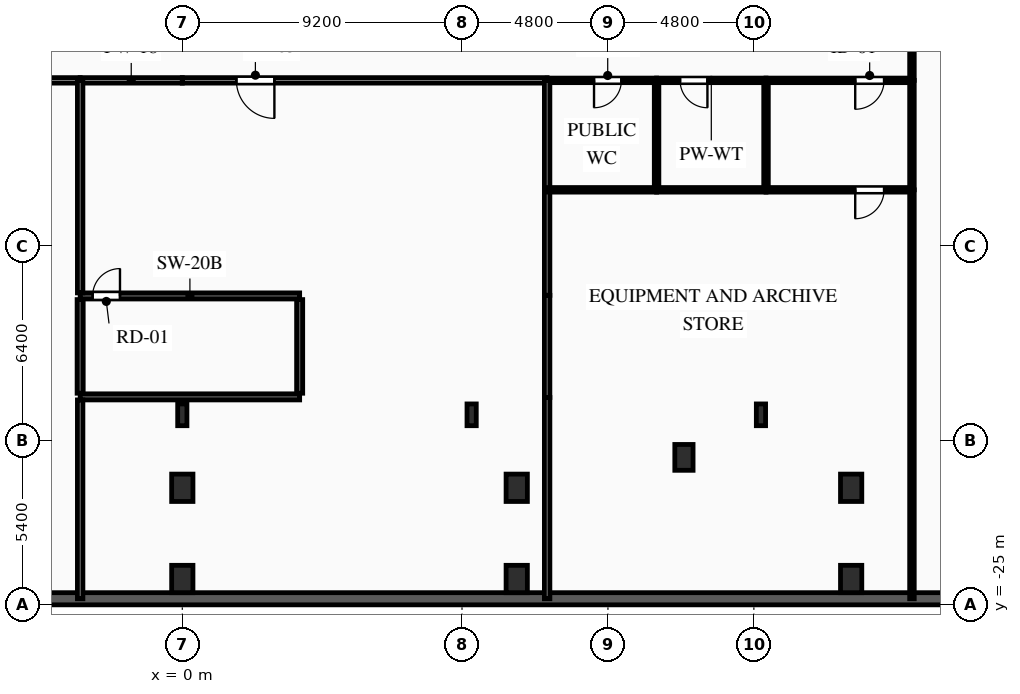
"""IFC4 building model, lengths in metres.
Left out: names, types, materials, properties, quantities, classifications, styles, units other than length and angle.
Written with IfcOpenShell. Run it as: python <this file> out.ifc"""

import sys

from ifc_helpers import new_model, si_unit, direction, frame, frame_2d, origin, origin_2d, place, context, subcontext, project, spatial, rectangle, i_section, extrude, element, fill, save


model = new_model("IFC4")
c1 = context("Model", 3, precision=1e-05, world=origin(), true_north=direction((0.0, 1.0)))
c2 = subcontext(c1, "Body", "Model", "MODEL_VIEW")
j1 = project(units=[si_unit("LENGTHUNIT", "METRE"), si_unit("PLANEANGLEUNIT", "RADIAN")], contexts=[c1])
p1 = place(None, origin())
s1 = spatial("IfcSite", under=j1, at=p1, CompositionType="ELEMENT")
p2 = place(p1, origin())
s2 = spatial("IfcBuilding", under=s1, at=p2, CompositionType="ELEMENT")
p3 = place(p2, frame((0.0, 0.0, -4.5)))
s3 = spatial("IfcBuildingStorey", under=s2, at=p3, CompositionType="ELEMENT", Elevation=-4.5)
for number, where, z_axis, x_axis in (
    (1, (0.0, -21.15, 0.0), (0.0, 0.0, 1.0), (1.0, 0.0, 0.0)),
    (2, (11.0, -21.15, 0.0), (0.0, 0.0, 1.0), (1.0, 0.0, 0.0)),
    (3, (22.0, -21.15, 0.0), (0.0, 0.0, 1.0), (1.0, 0.0, 0.0)),
    (4, (0.0, -24.15, 0.0), (0.0, 0.0, 1.0), (1.0, 0.0, 0.0)),
    (5, (11.0, -24.15, 0.0), (0.0, 0.0, 1.0), (1.0, 0.0, 0.0)),
    (6, (22.0, -24.15, 0.0), (0.0, 0.0, 1.0), (1.0, 0.0, 0.0)),
):
    element("IfcColumn", number, at=place(p3, frame(where, z_axis=z_axis, x_axis=x_axis)), inside=s3, PredefinedType="COLUMN", context=c2, shape_type="SweptSolid", body=[
        extrude(rectangle(XDim=0.7, YDim=0.9, at=origin_2d()), origin(), (0.0, 0.0, 1.0), 4.5),
    ])
p4 = place(p3, frame((16.5, -20.15, 0.0), z_axis=(0.0, 0.0, 1.0), x_axis=(1.0, 0.0, 0.0)))
e7 = element("IfcColumn", 7, at=p4, inside=s3, PredefinedType="PILASTER", context=c2, shape_type="SweptSolid", body=[
    extrude(rectangle(XDim=0.6, YDim=0.85, at=origin_2d()), origin(), (0.0, 0.0, 1.0), 4.5),
])
for number, where, z_axis, x_axis in (
    (8, (0.0, -18.75, 0.0), (0.0, 0.0, 1.0), (1.0, 0.0, 0.0)),
    (9, (9.517, -18.75, 0.0), (0.0, 0.0, 1.0), (1.0, 0.0, 0.0)),
    (10, (19.033, -18.75, 0.0), (0.0, 0.0, 1.0), (1.0, 0.0, 0.0)),
):
    element("IfcColumn", number, at=place(p3, frame(where, z_axis=z_axis, x_axis=x_axis)), inside=s3, PredefinedType="COLUMN", context=c2, shape_type="SweptSolid", body=[
        extrude(i_section(OverallWidth=0.304, OverallDepth=0.716, WebThickness=0.021, FlangeThickness=0.04, FilletRadius=0.027, at=origin_2d()), origin(), (0.0, 0.0, 1.0), 4.5),
    ])
p5 = place(p3, frame((38.3, -24.8, 0.0), z_axis=(0.0, 0.0, 1.0), x_axis=(-1.0, 0.0, 0.0)))
e11 = element("IfcWall", 11, at=p5, inside=s3, PredefinedType="SOLIDWALL", context=c2, shape_type="SweptSolid", body=[
    extrude(rectangle(XDim=76.6, YDim=0.4, at=frame_2d((38.3, 0.0))), origin(), (0.0, 0.0, 1.0), 4.16),
])
p6 = place(p3, frame((-3.36, -14.84, 0.0), z_axis=(0.0, 0.0, 1.0), x_axis=(1.0, 0.0, 0.0)))
e12 = element("IfcWall", 12, at=p6, inside=s3, PredefinedType="SHEAR", context=c2, shape_type="SweptSolid", body=[
    extrude(rectangle(XDim=7.22, YDim=0.2, at=frame_2d((3.61, 0.0))), origin(), (0.0, 0.0, 1.0), 4.16),
])
p7 = place(p6, frame((0.41, 0.0, 0.0)))
e13 = element("IfcOpeningElement", 13, at=p7, cuts=e12, PredefinedType="OPENING", context=c2, shape_type="SweptSolid", body=[
    extrude(rectangle(XDim=0.9, YDim=2.1, at=frame_2d((0.45, 1.05))), frame((0.0, 0.11, 0.0), z_axis=(0.0, -1.0, 0.0), x_axis=(1.0, 0.0, 0.0)), (0.0, 0.0, 1.0), 0.22),
])
p8 = place(p3, frame((-3.36, -18.16, 0.0), z_axis=(0.0, 0.0, 1.0), x_axis=(1.0, 0.0, 0.0)))
e14 = element("IfcWall", 14, at=p8, inside=s3, PredefinedType="SHEAR", context=c2, shape_type="SweptSolid", body=[
    extrude(rectangle(XDim=7.22, YDim=0.2, at=frame_2d((3.61, 0.0))), origin(), (0.0, 0.0, 1.0), 4.16),
])
for number, where, z_axis, x_axis in (
    (15, (-3.36, -18.04, 0.0), (0.0, 0.0, 1.0), (0.0, 1.0, 0.0)),
    (16, (3.86, -18.04, 0.0), (0.0, 0.0, 1.0), (0.0, 1.0, 0.0)),
):
    element("IfcWall", number, at=place(p3, frame(where, z_axis=z_axis, x_axis=x_axis)), inside=s3, PredefinedType="SHEAR", context=c2, shape_type="SweptSolid", body=[
        extrude(rectangle(XDim=3.08, YDim=0.2, at=frame_2d((1.54, 0.0))), origin(), (0.0, 0.0, 1.0), 4.16),
    ])
p9 = place(p3, frame((-3.36, -7.75, 0.0), z_axis=(0.0, 0.0, 1.0), x_axis=(-1.0, 0.0, 0.0)))
e17 = element("IfcWall", 17, at=p9, inside=s3, PredefinedType="PARTITIONING", context=c2, shape_type="SweptSolid", body=[
    extrude(rectangle(XDim=20.64, YDim=0.18, at=frame_2d((10.32, 0.0))), origin(), (0.0, 0.0, 1.0), 4.16),
])
p10 = place(p9, frame((9.695, 0.0, 0.0)))
e18 = element("IfcOpeningElement", 18, at=p10, cuts=e17, PredefinedType="OPENING", context=c2, shape_type="SweptSolid", body=[
    extrude(rectangle(XDim=1.25, YDim=2.2, at=frame_2d((0.625, 1.1))), frame((0.0, 0.1, 0.0), z_axis=(0.0, -1.0, 0.0), x_axis=(1.0, 0.0, 0.0)), (0.0, 0.0, 1.0), 0.2),
])
p11 = place(p3, frame((0.0, -7.75, 0.0), z_axis=(0.0, 0.0, 1.0), x_axis=(-1.0, 0.0, 0.0)))
e19 = element("IfcWall", 19, at=p11, inside=s3, PredefinedType="PARTITIONING", context=c2, shape_type="SweptSolid", body=[
    extrude(rectangle(XDim=3.36, YDim=0.18, at=frame_2d((1.68, 0.0))), origin(), (0.0, 0.0, 1.0), 4.16),
])
p12 = place(p3, frame((12.0, -7.75, 0.0), z_axis=(0.0, 0.0, 1.0), x_axis=(-1.0, 0.0, 0.0)))
e20 = element("IfcWall", 20, at=p12, inside=s3, PredefinedType="PARTITIONING", context=c2, shape_type="SweptSolid", body=[
    extrude(rectangle(XDim=12.0, YDim=0.18, at=frame_2d((6.0, 0.0))), origin(), (0.0, 0.0, 1.0), 4.16),
])
p13 = place(p12, frame((8.971, 0.0, 0.0)))
e21 = element("IfcOpeningElement", 21, at=p13, cuts=e20, PredefinedType="OPENING", context=c2, shape_type="SweptSolid", body=[
    extrude(rectangle(XDim=1.25, YDim=2.2, at=frame_2d((0.625, 1.1))), frame((0.0, 0.1, 0.0), z_axis=(0.0, -1.0, 0.0), x_axis=(1.0, 0.0, 0.0)), (0.0, 0.0, 1.0), 0.2),
])
p14 = place(p3, frame((24.0, -5.6, 0.0), z_axis=(0.0, 0.0, 1.0), x_axis=(0.0, -1.0, 0.0)))
e22 = element("IfcWall", 22, at=p14, inside=s3, PredefinedType="PARTITIONING", context=c2, shape_type="SweptSolid", body=[
    extrude(rectangle(XDim=2.15, YDim=0.15, at=frame_2d((1.075, 0.0))), origin(), (0.0, 0.0, 1.0), 4.16),
])
p15 = place(p3, frame((15.6, -7.75, 0.0), z_axis=(0.0, 0.0, 1.0), x_axis=(-1.0, 0.0, 0.0)))
e23 = element("IfcWall", 23, at=p15, inside=s3, PredefinedType="PLUMBINGWALL", context=c2, shape_type="SweptSolid", body=[
    extrude(rectangle(XDim=3.6, YDim=0.15, at=frame_2d((1.8, 0.0))), origin(), (0.0, 0.0, 1.0), 4.16),
])
p16 = place(p15, frame((1.157, 0.0, 0.0)))
e24 = element("IfcOpeningElement", 24, at=p16, cuts=e23, PredefinedType="OPENING", context=c2, shape_type="SweptSolid", body=[
    extrude(rectangle(XDim=0.9, YDim=2.1, at=frame_2d((0.45, 1.05))), frame((0.0, 0.085, 0.0), z_axis=(0.0, -1.0, 0.0), x_axis=(1.0, 0.0, 0.0)), (0.0, 0.0, 1.0), 0.17),
])
p17 = place(p3, frame((19.2, -7.75, 0.0), z_axis=(0.0, 0.0, 1.0), x_axis=(-1.0, 0.0, 0.0)))
e25 = element("IfcWall", 25, at=p17, inside=s3, PredefinedType="PLUMBINGWALL", context=c2, shape_type="SweptSolid", body=[
    extrude(rectangle(XDim=3.6, YDim=0.15, at=frame_2d((1.8, 0.0))), origin(), (0.0, 0.0, 1.0), 4.16),
])
p18 = place(p17, frame((1.927, 0.0, 0.0)))
e26 = element("IfcOpeningElement", 26, at=p18, cuts=e25, PredefinedType="OPENING", context=c2, shape_type="SweptSolid", body=[
    extrude(rectangle(XDim=0.9, YDim=2.1, at=frame_2d((0.45, 1.05))), frame((0.0, 0.085, 0.0), z_axis=(0.0, -1.0, 0.0), x_axis=(1.0, 0.0, 0.0)), (0.0, 0.0, 1.0), 0.17),
])
p19 = place(p3, frame((24.0, -7.75, 0.0), z_axis=(0.0, 0.0, 1.0), x_axis=(-1.0, 0.0, 0.0)))
e27 = element("IfcWall", 27, at=p19, inside=s3, PredefinedType="PARTITIONING", context=c2, shape_type="SweptSolid", body=[
    extrude(rectangle(XDim=4.8, YDim=0.15, at=frame_2d((2.4, 0.0))), origin(), (0.0, 0.0, 1.0), 4.16),
])
p20 = place(p19, frame((0.916, 0.0, 0.0)))
e28 = element("IfcOpeningElement", 28, at=p20, cuts=e27, PredefinedType="OPENING", context=c2, shape_type="SweptSolid", body=[
    extrude(rectangle(XDim=0.95, YDim=2.1, at=frame_2d((0.475, 1.05))), frame((0.0, 0.085, 0.0), z_axis=(0.0, -1.0, 0.0), x_axis=(1.0, 0.0, 0.0)), (0.0, 0.0, 1.0), 0.17),
])
p21 = place(p3, frame((-3.36, -7.75, 0.0), z_axis=(0.0, 0.0, 1.0), x_axis=(0.0, -1.0, 0.0)))
e29 = element("IfcWall", 29, at=p21, inside=s3, PredefinedType="PARTITIONING", context=c2, shape_type="SweptSolid", body=[
    extrude(rectangle(XDim=6.99, YDim=0.18, at=frame_2d((3.495, 0.0))), origin(), (0.0, 0.0, 1.0), 4.16),
])
p22 = place(p3, frame((-3.36, -18.26, 0.0), z_axis=(0.0, 0.0, 1.0), x_axis=(0.0, -1.0, 0.0)))
e30 = element("IfcWall", 30, at=p22, inside=s3, PredefinedType="PARTITIONING", context=c2, shape_type="SweptSolid", body=[
    extrude(rectangle(XDim=6.54, YDim=0.18, at=frame_2d((3.27, 0.0))), origin(), (0.0, 0.0, 1.0), 4.16),
])
p23 = place(p3, frame((12.0, -7.75, 0.0), z_axis=(0.0, 0.0, 1.0), x_axis=(0.0, -1.0, 0.0)))
e31 = element("IfcWall", 31, at=p23, inside=s3, PredefinedType="PARTITIONING", context=c2, shape_type="SweptSolid", body=[
    extrude(rectangle(XDim=3.6, YDim=0.18, at=frame_2d((1.8, 0.0))), origin(), (0.0, 0.0, 1.0), 4.16),
])
p24 = place(p3, frame((12.0, -18.18, 0.0), z_axis=(0.0, 0.0, 1.0), x_axis=(0.0, -1.0, 0.0)))
e32 = element("IfcWall", 32, at=p24, inside=s3, PredefinedType="PARTITIONING", context=c2, shape_type="SweptSolid", body=[
    extrude(rectangle(XDim=6.62, YDim=0.18, at=frame_2d((3.31, 0.0))), origin(), (0.0, 0.0, 1.0), 4.16),
])
p25 = place(p3, frame((12.0, -11.35, 0.0), z_axis=(0.0, 0.0, 1.0), x_axis=(0.0, -1.0, 0.0)))
e33 = element("IfcWall", 33, at=p25, inside=s3, PredefinedType="PARTITIONING", context=c2, shape_type="SweptSolid", body=[
    extrude(rectangle(XDim=3.47, YDim=0.18, at=frame_2d((1.735, 0.0))), origin(), (0.0, 0.0, 1.0), 4.16),
])
p26 = place(p3, frame((12.0, -14.82, 0.0), z_axis=(0.0, 0.0, 1.0), x_axis=(0.0, -1.0, 0.0)))
e34 = element("IfcWall", 34, at=p26, inside=s3, PredefinedType="PARTITIONING", context=c2, shape_type="SweptSolid", body=[
    extrude(rectangle(XDim=3.36, YDim=0.18, at=frame_2d((1.68, 0.0))), origin(), (0.0, 0.0, 1.0), 4.16),
])
p27 = place(p3, frame((24.0, -11.35, 0.0), z_axis=(0.0, 0.0, 1.0), x_axis=(0.0, 1.0, 0.0)))
e35 = element("IfcWall", 35, at=p27, inside=s3, PredefinedType="PARTITIONING", context=c2, shape_type="SweptSolid", body=[
    extrude(rectangle(XDim=3.6, YDim=0.15, at=frame_2d((1.8, 0.0))), origin(), (0.0, 0.0, 1.0), 4.16),
])
p28 = place(p3, frame((24.0, -24.8, 0.0), z_axis=(0.0, 0.0, 1.0), x_axis=(0.0, 1.0, 0.0)))
e36 = element("IfcWall", 36, at=p28, inside=s3, PredefinedType="PARTITIONING", context=c2, shape_type="SweptSolid", body=[
    extrude(rectangle(XDim=13.45, YDim=0.15, at=frame_2d((6.725, 0.0))), origin(), (0.0, 0.0, 1.0), 4.16),
])
for number, where, z_axis, x_axis in (
    (37, (15.6, -7.75, 0.0), (0.0, 0.0, 1.0), (0.0, -1.0, 0.0)),
    (38, (15.6, -11.35, 0.0), (0.0, 0.0, 1.0), (-1.0, 0.0, 0.0)),
    (39, (19.2, -7.75, 0.0), (0.0, 0.0, 1.0), (0.0, -1.0, 0.0)),
):
    element("IfcWall", number, at=place(p3, frame(where, z_axis=z_axis, x_axis=x_axis)), inside=s3, PredefinedType="PLUMBINGWALL", context=c2, shape_type="SweptSolid", body=[
        extrude(rectangle(XDim=3.6, YDim=0.15, at=frame_2d((1.8, 0.0))), origin(), (0.0, 0.0, 1.0), 4.16),
    ])
p29 = place(p3, frame((19.2, -11.35, 0.0), z_axis=(0.0, 0.0, 1.0), x_axis=(-1.0, 0.0, 0.0)))
e40 = element("IfcWall", 40, at=p29, inside=s3, PredefinedType="PLUMBINGWALL", context=c2, shape_type="SweptSolid", body=[
    extrude(rectangle(XDim=3.6, YDim=0.15, at=frame_2d((1.8, 0.0))), origin(), (0.0, 0.0, 1.0), 4.16),
])
p30 = place(p3, frame((24.0, -11.35, 0.0), z_axis=(0.0, 0.0, 1.0), x_axis=(-1.0, 0.0, 0.0)))
e41 = element("IfcWall", 41, at=p30, inside=s3, PredefinedType="PARTITIONING", context=c2, shape_type="SweptSolid", body=[
    extrude(rectangle(XDim=4.8, YDim=0.15, at=frame_2d((2.4, 0.0))), origin(), (0.0, 0.0, 1.0), 4.16),
])
p31 = place(p30, frame((0.916, 0.0, 0.0)))
e42 = element("IfcOpeningElement", 42, at=p31, cuts=e41, PredefinedType="OPENING", context=c2, shape_type="SweptSolid", body=[
    extrude(rectangle(XDim=0.95, YDim=2.1, at=frame_2d((0.475, 1.05))), frame((0.0, 0.085, 0.0), z_axis=(0.0, -1.0, 0.0), x_axis=(1.0, 0.0, 0.0)), (0.0, 0.0, 1.0), 0.17),
])
p32 = place(p7, origin())
e43 = element("IfcDoor", 43, at=p32, inside=s3, OperationType="SINGLE_SWING_RIGHT", PredefinedType="DOOR", context=c2, shape_type="SweptSolid", body=[
    extrude(rectangle(XDim=0.9, YDim=2.1, at=frame_2d((0.45, 1.05))), frame((0.0, 0.025, 0.0), z_axis=(0.0, -1.0, 0.0), x_axis=(1.0, 0.0, 0.0)), (0.0, 0.0, 1.0), 0.05),
])
fill(e13, e43)
p33 = place(p13, origin())
e44 = element("IfcDoor", 44, at=p33, inside=s3, OperationType="SINGLE_SWING_LEFT", PredefinedType="DOOR", context=c2, shape_type="SweptSolid", body=[
    extrude(rectangle(XDim=1.25, YDim=2.2, at=frame_2d((0.625, 1.1))), frame((0.0, 0.025, 0.0), z_axis=(0.0, -1.0, 0.0), x_axis=(1.0, 0.0, 0.0)), (0.0, 0.0, 1.0), 0.05),
])
fill(e21, e44)
p34 = place(p16, origin())
e45 = element("IfcDoor", 45, at=p34, inside=s3, OperationType="SINGLE_SWING_RIGHT", PredefinedType="DOOR", context=c2, shape_type="SweptSolid", body=[
    extrude(rectangle(XDim=0.9, YDim=2.1, at=frame_2d((0.45, 1.05))), frame((0.0, 0.025, 0.0), z_axis=(0.0, -1.0, 0.0), x_axis=(1.0, 0.0, 0.0)), (0.0, 0.0, 1.0), 0.05),
])
fill(e24, e45)
p35 = place(p18, origin())
e46 = element("IfcDoor", 46, at=p35, inside=s3, OperationType="SINGLE_SWING_LEFT", PredefinedType="DOOR", context=c2, shape_type="SweptSolid", body=[
    extrude(rectangle(XDim=0.9, YDim=2.1, at=frame_2d((0.45, 1.05))), frame((0.0, 0.025, 0.0), z_axis=(0.0, -1.0, 0.0), x_axis=(1.0, 0.0, 0.0)), (0.0, 0.0, 1.0), 0.05),
])
fill(e26, e46)
p36 = place(p20, origin())
e47 = element("IfcDoor", 47, at=p36, inside=s3, OperationType="SINGLE_SWING_RIGHT", PredefinedType="DOOR", context=c2, shape_type="SweptSolid", body=[
    extrude(rectangle(XDim=0.95, YDim=2.1, at=frame_2d((0.475, 1.05))), frame((0.0, 0.025, 0.0), z_axis=(0.0, -1.0, 0.0), x_axis=(1.0, 0.0, 0.0)), (0.0, 0.0, 1.0), 0.05),
])
fill(e28, e47)
p37 = place(p31, origin())
e48 = element("IfcDoor", 48, at=p37, inside=s3, OperationType="SINGLE_SWING_RIGHT", PredefinedType="DOOR", context=c2, shape_type="SweptSolid", body=[
    extrude(rectangle(XDim=0.95, YDim=2.1, at=frame_2d((0.475, 1.05))), frame((0.0, 0.025, 0.0), z_axis=(0.0, -1.0, 0.0), x_axis=(1.0, 0.0, 0.0)), (0.0, 0.0, 1.0), 0.05),
])
fill(e42, e48)
save(model, sys.argv[1])
